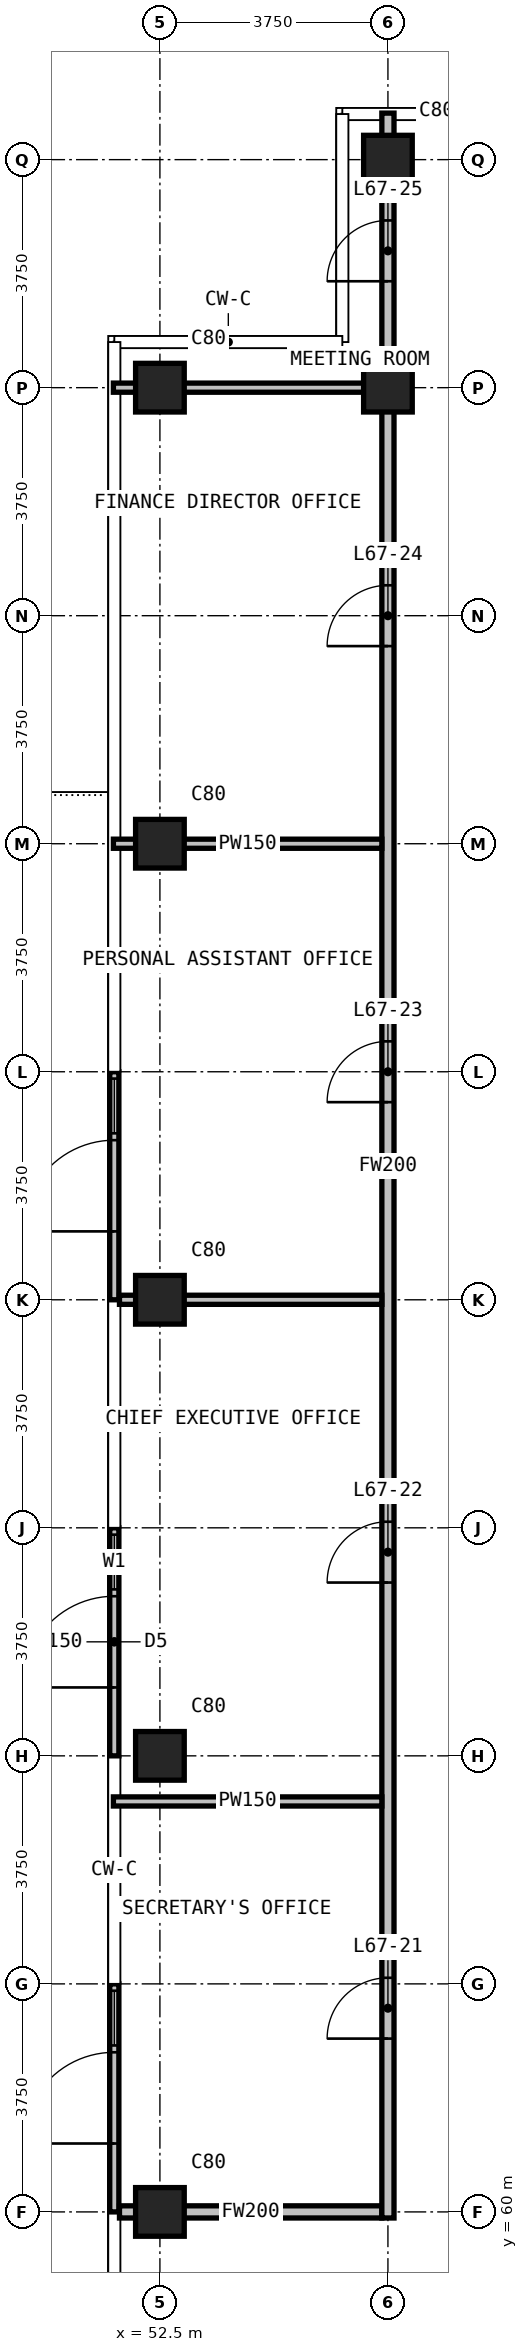
"""IFC4 building model, lengths in metres.
Left out: names, types, materials, properties, quantities, classifications, styles, units other than length and angle.
Written with IfcOpenShell. Run it as: python <this file> out.ifc"""

import sys

from ifc_helpers import new_model, si_unit, direction, frame, frame_2d, origin, origin_2d, place, context, subcontext, project, spatial, rectangle, extrude, element, fill, save


model = new_model("IFC4")
c1 = context("Model", 3, precision=1e-05, world=origin(), true_north=direction((0.0, 1.0)))
c2 = subcontext(c1, "Body", "Model", "MODEL_VIEW")
j1 = project(units=[si_unit("LENGTHUNIT", "METRE"), si_unit("PLANEANGLEUNIT", "RADIAN")], contexts=[c1])
p1 = place(None, origin())
s1 = spatial("IfcSite", under=j1, at=p1, CompositionType="ELEMENT")
p2 = place(p1, origin())
s2 = spatial("IfcBuilding", under=s1, at=p2, CompositionType="ELEMENT")
p3 = place(p2, frame((0.0, 0.0, 258.5)))
s3 = spatial("IfcBuildingStorey", under=s2, at=p3, CompositionType="ELEMENT", Elevation=258.5)
for number, where, z_axis, x_axis in (
    (1, (52.5, 60.0, 0.0), (0.0, 0.0, 1.0), (1.0, 0.0, 0.0)),
    (2, (52.5, 67.5, 0.0), (0.0, 0.0, 1.0), (1.0, 0.0, 0.0)),
    (3, (52.5, 75.0, 0.0), (0.0, 0.0, 1.0), (1.0, 0.0, 0.0)),
    (4, (52.5, 82.5, 0.0), (0.0, 0.0, 1.0), (1.0, 0.0, 0.0)),
    (5, (52.5, 90.0, 0.0), (0.0, 0.0, 1.0), (1.0, 0.0, 0.0)),
    (6, (56.25, 90.0, 0.0), (0.0, 0.0, 1.0), (1.0, 0.0, 0.0)),
    (7, (56.25, 93.75, 0.0), (0.0, 0.0, 1.0), (1.0, 0.0, 0.0)),
):
    element("IfcColumn", number, at=place(p3, frame(where, z_axis=z_axis, x_axis=x_axis)), inside=s3, PredefinedType="COLUMN", context=c2, shape_type="SweptSolid", body=[
        extrude(rectangle(XDim=0.8, YDim=0.8, at=origin_2d()), origin(), (0.0, 0.0, 1.0), 3.6),
    ])
p4 = place(p3, frame((51.75, 60.0, 0.0), z_axis=(0.0, 0.0, 1.0), x_axis=(0.0, 1.0, 0.0)))
e8 = element("IfcWall", 8, at=p4, inside=s3, PredefinedType="SOLIDWALL", context=c2, shape_type="SweptSolid", body=[
    extrude(rectangle(XDim=3.75, YDim=0.15, at=frame_2d((1.875, 0.0))), origin(), (0.0, 0.0, 1.0), 3.3),
])
p5 = place(p4, frame((1.125, 0.0, 0.0)))
e9 = element("IfcOpeningElement", 9, at=p5, cuts=e8, PredefinedType="OPENING", context=c2, shape_type="SweptSolid", body=[
    extrude(rectangle(XDim=1.5, YDim=2.4, at=frame_2d((0.75, 1.2))), frame((0.0, 0.085, 0.0), z_axis=(0.0, -1.0, 0.0), x_axis=(1.0, 0.0, 0.0)), (0.0, 0.0, 1.0), 0.17),
])
p6 = place(p4, frame((2.738, 0.0, 0.1)))
e10 = element("IfcOpeningElement", 10, at=p6, cuts=e8, PredefinedType="OPENING", context=c2, shape_type="SweptSolid", body=[
    extrude(rectangle(XDim=0.9, YDim=2.4, at=frame_2d((0.45, 1.2))), frame((0.0, 0.085, 0.0), z_axis=(0.0, -1.0, 0.0), x_axis=(1.0, 0.0, 0.0)), (0.0, 0.0, 1.0), 0.17),
])
p7 = place(p3, frame((51.75, 67.5, 0.0), z_axis=(0.0, 0.0, 1.0), x_axis=(0.0, 1.0, 0.0)))
e11 = element("IfcWall", 11, at=p7, inside=s3, PredefinedType="SOLIDWALL", context=c2, shape_type="SweptSolid", body=[
    extrude(rectangle(XDim=3.75, YDim=0.15, at=frame_2d((1.875, 0.0))), origin(), (0.0, 0.0, 1.0), 3.3),
])
p8 = place(p7, frame((1.125, 0.0, 0.0)))
e12 = element("IfcOpeningElement", 12, at=p8, cuts=e11, PredefinedType="OPENING", context=c2, shape_type="SweptSolid", body=[
    extrude(rectangle(XDim=1.5, YDim=2.4, at=frame_2d((0.75, 1.2))), frame((0.0, 0.085, 0.0), z_axis=(0.0, -1.0, 0.0), x_axis=(1.0, 0.0, 0.0)), (0.0, 0.0, 1.0), 0.17),
])
p9 = place(p7, frame((2.738, 0.0, 0.1)))
e13 = element("IfcOpeningElement", 13, at=p9, cuts=e11, PredefinedType="OPENING", context=c2, shape_type="SweptSolid", body=[
    extrude(rectangle(XDim=0.9, YDim=2.4, at=frame_2d((0.45, 1.2))), frame((0.0, 0.085, 0.0), z_axis=(0.0, -1.0, 0.0), x_axis=(1.0, 0.0, 0.0)), (0.0, 0.0, 1.0), 0.17),
])
p10 = place(p3, frame((51.75, 75.0, 0.0), z_axis=(0.0, 0.0, 1.0), x_axis=(0.0, 1.0, 0.0)))
e14 = element("IfcWall", 14, at=p10, inside=s3, PredefinedType="SOLIDWALL", context=c2, shape_type="SweptSolid", body=[
    extrude(rectangle(XDim=3.75, YDim=0.15, at=frame_2d((1.875, 0.0))), origin(), (0.0, 0.0, 1.0), 3.3),
])
p11 = place(p10, frame((1.125, 0.0, 0.0)))
e15 = element("IfcOpeningElement", 15, at=p11, cuts=e14, PredefinedType="OPENING", context=c2, shape_type="SweptSolid", body=[
    extrude(rectangle(XDim=1.5, YDim=2.4, at=frame_2d((0.75, 1.2))), frame((0.0, 0.085, 0.0), z_axis=(0.0, -1.0, 0.0), x_axis=(1.0, 0.0, 0.0)), (0.0, 0.0, 1.0), 0.17),
])
p12 = place(p10, frame((2.738, 0.0, 0.1)))
e16 = element("IfcOpeningElement", 16, at=p12, cuts=e14, PredefinedType="OPENING", context=c2, shape_type="SweptSolid", body=[
    extrude(rectangle(XDim=0.9, YDim=2.4, at=frame_2d((0.45, 1.2))), frame((0.0, 0.085, 0.0), z_axis=(0.0, -1.0, 0.0), x_axis=(1.0, 0.0, 0.0)), (0.0, 0.0, 1.0), 0.17),
])
p13 = place(p3, frame((51.835, 60.0, 0.0), z_axis=(0.0, 0.0, 1.0), x_axis=(1.0, 0.0, 0.0)))
e17 = element("IfcWall", 17, at=p13, inside=s3, PredefinedType="PARTITIONING", context=c2, shape_type="SweptSolid", body=[
    extrude(rectangle(XDim=4.315, YDim=0.2, at=frame_2d((2.157, 0.0))), origin(), (0.0, 0.0, 1.0), 3.3),
])
p14 = place(p3, frame((56.25, 59.9, 0.0), z_axis=(0.0, 0.0, 1.0), x_axis=(0.0, 1.0, 0.0)))
e18 = element("IfcWall", 18, at=p14, inside=s3, PredefinedType="PARTITIONING", context=c2, shape_type="SweptSolid", body=[
    extrude(rectangle(XDim=34.615, YDim=0.2, at=frame_2d((17.308, 0.0))), origin(), (0.0, 0.0, 1.0), 3.3),
])
p15 = place(p14, frame((2.95, 0.0, 0.0)))
e19 = element("IfcOpeningElement", 19, at=p15, cuts=e18, PredefinedType="OPENING", context=c2, shape_type="SweptSolid", body=[
    extrude(rectangle(XDim=1.0, YDim=2.2, at=frame_2d((0.5, 1.1))), frame((0.0, 0.11, 0.0), z_axis=(0.0, -1.0, 0.0), x_axis=(1.0, 0.0, 0.0)), (0.0, 0.0, 1.0), 0.22),
])
p16 = place(p14, frame((10.45, 0.0, 0.0)))
e20 = element("IfcOpeningElement", 20, at=p16, cuts=e18, PredefinedType="OPENING", context=c2, shape_type="SweptSolid", body=[
    extrude(rectangle(XDim=1.0, YDim=2.2, at=frame_2d((0.5, 1.1))), frame((0.0, 0.11, 0.0), z_axis=(0.0, -1.0, 0.0), x_axis=(1.0, 0.0, 0.0)), (0.0, 0.0, 1.0), 0.22),
])
p17 = place(p14, frame((18.35, 0.0, 0.0)))
e21 = element("IfcOpeningElement", 21, at=p17, cuts=e18, PredefinedType="OPENING", context=c2, shape_type="SweptSolid", body=[
    extrude(rectangle(XDim=1.0, YDim=2.2, at=frame_2d((0.5, 1.1))), frame((0.0, 0.11, 0.0), z_axis=(0.0, -1.0, 0.0), x_axis=(1.0, 0.0, 0.0)), (0.0, 0.0, 1.0), 0.22),
])
p18 = place(p14, frame((25.85, 0.0, 0.0)))
e22 = element("IfcOpeningElement", 22, at=p18, cuts=e18, PredefinedType="OPENING", context=c2, shape_type="SweptSolid", body=[
    extrude(rectangle(XDim=1.0, YDim=2.2, at=frame_2d((0.5, 1.1))), frame((0.0, 0.11, 0.0), z_axis=(0.0, -1.0, 0.0), x_axis=(1.0, 0.0, 0.0)), (0.0, 0.0, 1.0), 0.22),
])
p19 = place(p14, frame((31.85, 0.0, 0.0)))
e23 = element("IfcOpeningElement", 23, at=p19, cuts=e18, PredefinedType="OPENING", context=c2, shape_type="SweptSolid", body=[
    extrude(rectangle(XDim=1.0, YDim=2.2, at=frame_2d((0.5, 1.1))), frame((0.0, 0.11, 0.0), z_axis=(0.0, -1.0, 0.0), x_axis=(1.0, 0.0, 0.0)), (0.0, 0.0, 1.0), 0.22),
])
p20 = place(p3, frame((51.735, 66.75, 0.0), z_axis=(0.0, 0.0, 1.0), x_axis=(1.0, 0.0, 0.0)))
e24 = element("IfcWall", 24, at=p20, inside=s3, PredefinedType="PARTITIONING", context=c2, shape_type="SweptSolid", body=[
    extrude(rectangle(XDim=4.415, YDim=0.15, at=frame_2d((2.208, 0.0))), origin(), (0.0, 0.0, 1.0), 3.3),
])
p21 = place(p3, frame((51.835, 75.0, 0.0), z_axis=(0.0, 0.0, 1.0), x_axis=(1.0, 0.0, 0.0)))
e25 = element("IfcWall", 25, at=p21, inside=s3, PredefinedType="PARTITIONING", context=c2, shape_type="SweptSolid", body=[
    extrude(rectangle(XDim=4.315, YDim=0.15, at=frame_2d((2.157, 0.0))), origin(), (0.0, 0.0, 1.0), 3.3),
])
for number, where, z_axis, x_axis in (
    (26, (51.735, 82.5, 0.0), (0.0, 0.0, 1.0), (1.0, 0.0, 0.0)),
    (27, (51.735, 90.0, 0.0), (0.0, 0.0, 1.0), (1.0, 0.0, 0.0)),
):
    element("IfcWall", number, at=place(p3, frame(where, z_axis=z_axis, x_axis=x_axis)), inside=s3, PredefinedType="PARTITIONING", context=c2, shape_type="SweptSolid", body=[
        extrude(rectangle(XDim=4.415, YDim=0.15, at=frame_2d((2.208, 0.0))), origin(), (0.0, 0.0, 1.0), 3.3),
    ])
p22 = place(p5, origin())
e28 = element("IfcDoor", 28, at=p22, inside=s3, OperationType="DOUBLE_DOOR_SINGLE_SWING", PredefinedType="DOOR", context=c2, shape_type="SweptSolid", body=[
    extrude(rectangle(XDim=1.5, YDim=2.4, at=frame_2d((0.75, 1.2))), frame((0.0, 0.025, 0.0), z_axis=(0.0, -1.0, 0.0), x_axis=(1.0, 0.0, 0.0)), (0.0, 0.0, 1.0), 0.05),
])
fill(e9, e28)
p23 = place(p6, origin())
e29 = element("IfcWindow", 29, at=p23, inside=s3, PartitioningType="SINGLE_PANEL", PredefinedType="WINDOW", context=c2, shape_type="SweptSolid", body=[
    extrude(rectangle(XDim=0.9, YDim=2.4, at=frame_2d((0.45, 1.2))), frame((0.0, 0.03, 0.0), z_axis=(0.0, -1.0, 0.0), x_axis=(1.0, 0.0, 0.0)), (0.0, 0.0, 1.0), 0.06),
])
fill(e10, e29)
p24 = place(p8, origin())
e30 = element("IfcDoor", 30, at=p24, inside=s3, OperationType="DOUBLE_DOOR_SINGLE_SWING", PredefinedType="DOOR", context=c2, shape_type="SweptSolid", body=[
    extrude(rectangle(XDim=1.5, YDim=2.4, at=frame_2d((0.75, 1.2))), frame((0.0, 0.025, 0.0), z_axis=(0.0, -1.0, 0.0), x_axis=(1.0, 0.0, 0.0)), (0.0, 0.0, 1.0), 0.05),
])
fill(e12, e30)
p25 = place(p9, origin())
e31 = element("IfcWindow", 31, at=p25, inside=s3, PartitioningType="SINGLE_PANEL", PredefinedType="WINDOW", context=c2, shape_type="SweptSolid", body=[
    extrude(rectangle(XDim=0.9, YDim=2.4, at=frame_2d((0.45, 1.2))), frame((0.0, 0.03, 0.0), z_axis=(0.0, -1.0, 0.0), x_axis=(1.0, 0.0, 0.0)), (0.0, 0.0, 1.0), 0.06),
])
fill(e13, e31)
p26 = place(p11, origin())
e32 = element("IfcDoor", 32, at=p26, inside=s3, OperationType="DOUBLE_DOOR_SINGLE_SWING", PredefinedType="DOOR", context=c2, shape_type="SweptSolid", body=[
    extrude(rectangle(XDim=1.5, YDim=2.4, at=frame_2d((0.75, 1.2))), frame((0.0, 0.025, 0.0), z_axis=(0.0, -1.0, 0.0), x_axis=(1.0, 0.0, 0.0)), (0.0, 0.0, 1.0), 0.05),
])
fill(e15, e32)
p27 = place(p12, origin())
e33 = element("IfcWindow", 33, at=p27, inside=s3, PartitioningType="SINGLE_PANEL", PredefinedType="WINDOW", context=c2, shape_type="SweptSolid", body=[
    extrude(rectangle(XDim=0.9, YDim=2.4, at=frame_2d((0.45, 1.2))), frame((0.0, 0.03, 0.0), z_axis=(0.0, -1.0, 0.0), x_axis=(1.0, 0.0, 0.0)), (0.0, 0.0, 1.0), 0.06),
])
fill(e16, e33)
p28 = place(p15, origin())
e34 = element("IfcDoor", 34, at=p28, inside=s3, OperationType="SINGLE_SWING_LEFT", PredefinedType="DOOR", context=c2, shape_type="SweptSolid", body=[
    extrude(rectangle(XDim=1.0, YDim=2.2, at=frame_2d((0.5, 1.1))), frame((0.0, 0.025, 0.0), z_axis=(0.0, -1.0, 0.0), x_axis=(1.0, 0.0, 0.0)), (0.0, 0.0, 1.0), 0.05),
])
fill(e19, e34)
p29 = place(p16, origin())
e35 = element("IfcDoor", 35, at=p29, inside=s3, OperationType="SINGLE_SWING_LEFT", PredefinedType="DOOR", context=c2, shape_type="SweptSolid", body=[
    extrude(rectangle(XDim=1.0, YDim=2.2, at=frame_2d((0.5, 1.1))), frame((0.0, 0.025, 0.0), z_axis=(0.0, -1.0, 0.0), x_axis=(1.0, 0.0, 0.0)), (0.0, 0.0, 1.0), 0.05),
])
fill(e20, e35)
p30 = place(p17, origin())
e36 = element("IfcDoor", 36, at=p30, inside=s3, OperationType="SINGLE_SWING_LEFT", PredefinedType="DOOR", context=c2, shape_type="SweptSolid", body=[
    extrude(rectangle(XDim=1.0, YDim=2.2, at=frame_2d((0.5, 1.1))), frame((0.0, 0.025, 0.0), z_axis=(0.0, -1.0, 0.0), x_axis=(1.0, 0.0, 0.0)), (0.0, 0.0, 1.0), 0.05),
])
fill(e21, e36)
p31 = place(p18, origin())
e37 = element("IfcDoor", 37, at=p31, inside=s3, OperationType="SINGLE_SWING_RIGHT", PredefinedType="DOOR", context=c2, shape_type="SweptSolid", body=[
    extrude(rectangle(XDim=1.0, YDim=2.2, at=frame_2d((0.5, 1.1))), frame((0.0, 0.025, 0.0), z_axis=(0.0, -1.0, 0.0), x_axis=(1.0, 0.0, 0.0)), (0.0, 0.0, 1.0), 0.05),
])
fill(e22, e37)
p32 = place(p19, origin())
e38 = element("IfcDoor", 38, at=p32, inside=s3, OperationType="SINGLE_SWING_LEFT", PredefinedType="DOOR", context=c2, shape_type="SweptSolid", body=[
    extrude(rectangle(XDim=1.0, YDim=2.2, at=frame_2d((0.5, 1.1))), frame((0.0, 0.025, 0.0), z_axis=(0.0, -1.0, 0.0), x_axis=(1.0, 0.0, 0.0)), (0.0, 0.0, 1.0), 0.05),
])
fill(e23, e38)
save(model, sys.argv[1])
